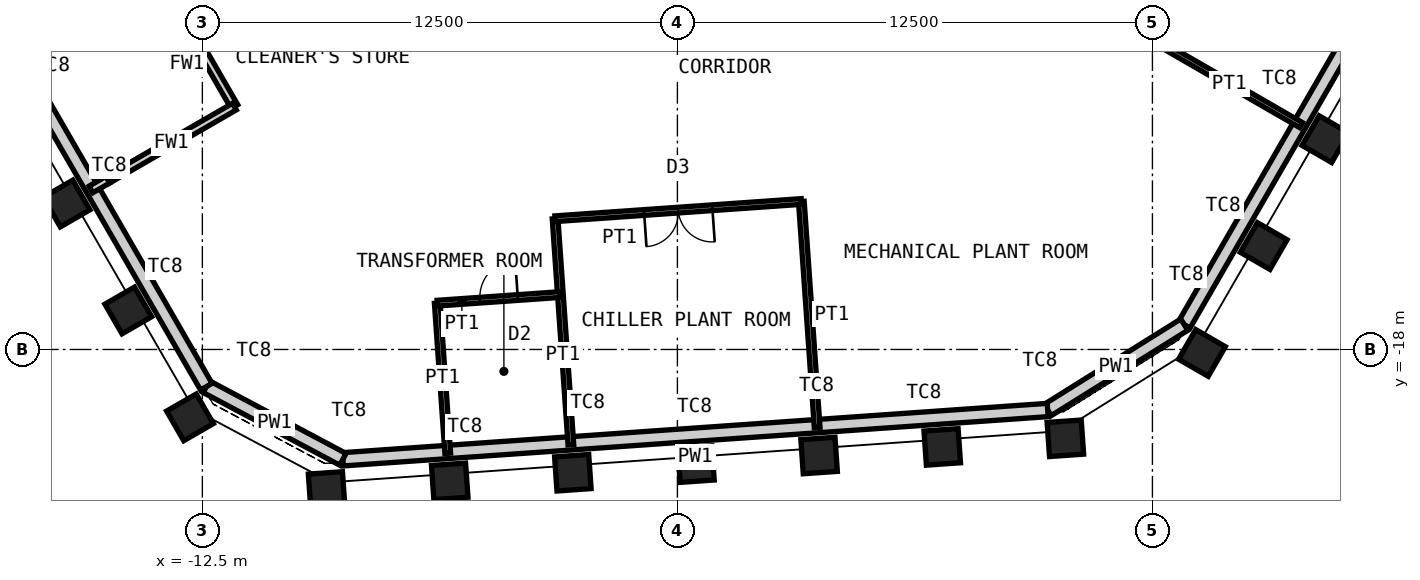
"""IFC4 building model, lengths in metres.
Left out: names, types, materials, properties, quantities, classifications, styles, units other than length and angle.
Written with IfcOpenShell. Run it as: python <this file> out.ifc"""

import sys

from ifc_helpers import new_model, si_unit, direction, frame, frame_2d, origin, origin_2d, place, context, subcontext, project, spatial, rectangle, hollow_rectangle, extrude, element, fill, save


model = new_model("IFC4")
c1 = context("Model", 3, precision=1e-05, world=origin(), true_north=direction((0.0, 1.0)))
c2 = subcontext(c1, "Body", "Model", "MODEL_VIEW")
j1 = project(units=[si_unit("LENGTHUNIT", "METRE"), si_unit("PLANEANGLEUNIT", "RADIAN")], contexts=[c1])
p1 = place(None, origin())
s1 = spatial("IfcSite", under=j1, at=p1, CompositionType="ELEMENT")
p2 = place(p1, origin())
s2 = spatial("IfcBuilding", under=s1, at=p2, CompositionType="ELEMENT")
p3 = place(p2, frame((0.0, 0.0, 343.6)))
s3 = spatial("IfcBuildingStorey", under=s2, at=p3, CompositionType="ELEMENT", Elevation=343.6)
for number, where, z_axis, x_axis in (
    (1, (17.052, -12.466, 0.0), (0.0, 0.0, 1.0), (0.5, 0.866, 0.0)),
    (2, (15.427, -15.279, 0.0), (0.0, 0.0, 1.0), (0.5, 0.866, 0.0)),
    (3, (13.803, -18.092, 0.0), (0.0, 0.0, 1.0), (0.5, 0.866, 0.0)),
    (4, (10.209, -20.337, 0.0), (0.0, 0.0, 1.0), (0.998, 0.07, 0.0)),
    (5, (6.969, -20.564, 0.0), (0.0, 0.0, 1.0), (0.998, 0.07, 0.0)),
    (6, (3.729, -20.791, 0.0), (0.0, 0.0, 1.0), (0.998, 0.07, 0.0)),
    (7, (0.489, -21.017, 0.0), (0.0, 0.0, 1.0), (0.998, 0.07, 0.0)),
    (8, (-2.751, -21.244, 0.0), (0.0, 0.0, 1.0), (0.998, 0.07, 0.0)),
    (9, (-5.991, -21.47, 0.0), (0.0, 0.0, 1.0), (0.998, 0.07, 0.0)),
    (10, (-9.231, -21.697, 0.0), (0.0, 0.0, 1.0), (0.998, 0.07, 0.0)),
    (11, (-12.825, -19.786, 0.0), (0.0, 0.0, 1.0), (0.5, -0.866, 0.0)),
    (12, (-14.449, -16.973, 0.0), (0.0, 0.0, 1.0), (0.5, -0.866, 0.0)),
    (13, (-16.073, -14.16, 0.0), (0.0, 0.0, 1.0), (0.5, -0.866, 0.0)),
):
    element("IfcColumn", number, at=place(p3, frame(where, z_axis=z_axis, x_axis=x_axis)), inside=s3, PredefinedType="COLUMN", context=c2, shape_type="SweptSolid", body=[
        extrude(hollow_rectangle(XDim=0.9, YDim=0.9, WallThickness=0.05, at=origin_2d()), origin(), (0.0, 0.0, 1.0), 4.65),
    ])
p4 = place(p3, frame((22.634, -1.246, 5.0), z_axis=(0.0, 0.0, 1.0), x_axis=(-0.499997535337, -0.866026826754, 0.0)))
e14 = element("IfcWall", 14, at=p4, inside=s3, PredefinedType="PARAPET", context=c2, shape_type="SweptSolid", body=[
    extrude(rectangle(XDim=18.592, YDim=0.35, at=frame_2d((9.296, 0.0))), origin(), (0.0, 0.0, 1.0), 1.2),
])
p5 = place(p3, frame((13.338, -17.347, 5.0), z_axis=(0.0, 0.0, 1.0), x_axis=(-0.848040374245, -0.529931621675, 0.0)))
e15 = element("IfcWall", 15, at=p5, inside=s3, PredefinedType="PARAPET", context=c2, shape_type="SweptSolid", body=[
    extrude(rectangle(XDim=4.238, YDim=0.35, at=frame_2d((2.119, 0.0))), origin(), (0.0, 0.0, 1.0), 1.2),
])
p6 = place(p3, frame((9.744, -19.593, 5.0), z_axis=(0.0, 0.0, 1.0), x_axis=(-0.997564169162, -0.069754773344, 0.0)))
e16 = element("IfcWall", 16, at=p6, inside=s3, PredefinedType="PARAPET", context=c2, shape_type="SweptSolid", body=[
    extrude(rectangle(XDim=18.592, YDim=0.35, at=frame_2d((9.296, 0.0))), origin(), (0.0, 0.0, 1.0), 1.2),
])
p7 = place(p3, frame((-8.802, -20.89, 5.0), z_axis=(0.0, 0.0, 1.0), x_axis=(-0.882943273379, 0.469479686456, 0.0)))
e17 = element("IfcWall", 17, at=p7, inside=s3, PredefinedType="PARAPET", context=c2, shape_type="SweptSolid", body=[
    extrude(rectangle(XDim=4.071, YDim=0.35, at=frame_2d((2.035, 0.0))), origin(), (0.0, 0.0, 1.0), 1.2),
])
p8 = place(p3, frame((-12.396, -18.979, 5.0), z_axis=(0.0, 0.0, 1.0), x_axis=(-0.500003221507, 0.866023543838, 0.0)))
e18 = element("IfcWall", 18, at=p8, inside=s3, PredefinedType="PARAPET", context=c2, shape_type="SweptSolid", body=[
    extrude(rectangle(XDim=18.592, YDim=0.35, at=frame_2d((9.296, 0.0))), origin(), (0.0, 0.0, 1.0), 1.2),
])
p9 = place(p3, frame((3.677, -20.052, 0.0), z_axis=(0.0, 0.0, 1.0), x_axis=(-0.069762273607, 0.997563644677, 0.0)))
e19 = element("IfcWall", 19, at=p9, inside=s3, PredefinedType="PARTITIONING", context=c2, shape_type="SweptSolid", body=[
    extrude(rectangle(XDim=5.96, YDim=0.15, at=frame_2d((2.98, 0.0))), origin(), (0.0, 0.0, 1.0), 3.75),
])
p10 = place(p3, frame((-2.803, -20.505, 0.0), z_axis=(0.0, 0.0, 1.0), x_axis=(-0.069762273607, 0.997563644677, 0.0)))
e20 = element("IfcWall", 20, at=p10, inside=s3, PredefinedType="PARTITIONING", context=c2, shape_type="SweptSolid", body=[
    extrude(rectangle(XDim=5.96, YDim=0.15, at=frame_2d((2.98, 0.0))), origin(), (0.0, 0.0, 1.0), 4.65),
])
p11 = place(p3, frame((3.262, -14.107, 0.0), z_axis=(0.0, 0.0, 1.0), x_axis=(-0.997564226446, -0.069753954123, 0.0)))
e21 = element("IfcWall", 21, at=p11, inside=s3, PredefinedType="PARTITIONING", context=c2, shape_type="SweptSolid", body=[
    extrude(rectangle(XDim=6.496, YDim=0.15, at=frame_2d((3.248, 0.0))), origin(), (0.0, 0.0, 1.0), 4.65),
])
p12 = place(p11, frame((2.348, 0.0, 0.0)))
e22 = element("IfcOpeningElement", 22, at=p12, cuts=e21, PredefinedType="OPENING", context=c2, shape_type="SweptSolid", body=[
    extrude(rectangle(XDim=1.8, YDim=2.4, at=frame_2d((0.9, 1.2))), frame((0.0, 0.085, 0.0), z_axis=(0.0, -1.0, 0.0), x_axis=(1.0, 0.0, 0.0)), (0.0, 0.0, 1.0), 0.17),
])
p13 = place(p3, frame((16.411, -12.096, 0.0), z_axis=(0.0, 0.0, 1.0), x_axis=(-0.866032659912, 0.499987431809, 0.0)))
e23 = element("IfcWall", 23, at=p13, inside=s3, PredefinedType="PARTITIONING", context=c2, shape_type="SweptSolid", body=[
    extrude(rectangle(XDim=4.36, YDim=0.15, at=frame_2d((2.18, 0.0))), origin(), (0.0, 0.0, 1.0), 3.75),
])
p14 = place(p3, frame((-15.433, -13.79, 0.0), z_axis=(0.0, 0.0, 1.0), x_axis=(0.866114856374, 0.499845031553, 0.0)))
e24 = element("IfcWall", 24, at=p14, inside=s3, PredefinedType="PARTITIONING", context=c2, shape_type="SweptSolid", body=[
    extrude(rectangle(XDim=0.517, YDim=0.2, at=frame_2d((0.259, 0.0))), origin(), (0.0, 0.0, 1.0), 3.75),
])
p15 = place(p3, frame((-11.657, -11.61, 0.0), z_axis=(0.0, 0.0, 1.0), x_axis=(-0.500003318956, 0.866023487576, 0.0)))
e25 = element("IfcWall", 25, at=p15, inside=s3, PredefinedType="PARTITIONING", context=c2, shape_type="SweptSolid", body=[
    extrude(rectangle(XDim=6.496, YDim=0.2, at=frame_2d((3.248, 0.0))), origin(), (0.0, 0.0, 1.0), 4.65),
])
p16 = place(p15, frame((4.197, 0.0, 0.0)))
e26 = element("IfcOpeningElement", 26, at=p16, cuts=e25, PredefinedType="OPENING", context=c2, shape_type="SweptSolid", body=[
    extrude(rectangle(XDim=2.0, YDim=2.4, at=frame_2d((1.0, 1.2))), frame((0.0, 0.11, 0.0), z_axis=(0.0, -1.0, 0.0), x_axis=(1.0, 0.0, 0.0)), (0.0, 0.0, 1.0), 0.22),
])
p17 = place(p3, frame((-6.043, -20.732, 0.0), z_axis=(0.0, 0.0, 1.0), x_axis=(-0.069792315638, 0.997561543303, 0.0)))
e27 = element("IfcWall", 27, at=p17, inside=s3, PredefinedType="PARTITIONING", context=c2, shape_type="SweptSolid", body=[
    extrude(rectangle(XDim=3.96, YDim=0.15, at=frame_2d((1.98, 0.0))), origin(), (0.0, 0.0, 1.0), 4.65),
])
p18 = place(p3, frame((-3.079, -16.555, 0.0), z_axis=(0.0, 0.0, 1.0), x_axis=(-0.9975644093, -0.069751339047, 0.0)))
e28 = element("IfcWall", 28, at=p18, inside=s3, PredefinedType="PARTITIONING", context=c2, shape_type="SweptSolid", body=[
    extrude(rectangle(XDim=3.248, YDim=0.15, at=frame_2d((1.624, 0.0))), origin(), (0.0, 0.0, 1.0), 4.65),
])
p19 = place(p18, frame((1.124, 0.0, 0.0)))
e29 = element("IfcOpeningElement", 29, at=p19, cuts=e28, PredefinedType="OPENING", context=c2, shape_type="SweptSolid", body=[
    extrude(rectangle(XDim=1.0, YDim=2.4, at=frame_2d((0.5, 1.2))), frame((0.0, 0.085, 0.0), z_axis=(0.0, -1.0, 0.0), x_axis=(1.0, 0.0, 0.0)), (0.0, 0.0, 1.0), 0.17),
])
p20 = place(p3, frame((-14.985, -13.531, 0.0), z_axis=(0.0, 0.0, 1.0), x_axis=(0.866021594059, 0.50000659858, 0.0)))
e30 = element("IfcWall", 30, at=p20, inside=s3, PredefinedType="PARTITIONING", context=c2, shape_type="SweptSolid", body=[
    extrude(rectangle(XDim=3.843, YDim=0.2, at=frame_2d((1.921, 0.0))), origin(), (0.0, 0.0, 1.0), 4.65),
])
p21 = place(p12, origin())
e31 = element("IfcDoor", 31, at=p21, inside=s3, OperationType="DOUBLE_DOOR_DOUBLE_SWING", PredefinedType="DOOR", context=c2, shape_type="SweptSolid", body=[
    extrude(rectangle(XDim=1.8, YDim=2.4, at=frame_2d((0.9, 1.2))), frame((0.0, 0.025, 0.0), z_axis=(0.0, -1.0, 0.0), x_axis=(1.0, 0.0, 0.0)), (0.0, 0.0, 1.0), 0.05),
])
fill(e22, e31)
p22 = place(p19, origin())
e32 = element("IfcDoor", 32, at=p22, inside=s3, OperationType="SINGLE_SWING_LEFT", PredefinedType="DOOR", context=c2, shape_type="SweptSolid", body=[
    extrude(rectangle(XDim=1.0, YDim=2.4, at=frame_2d((0.5, 1.2))), frame((0.0, 0.025, 0.0), z_axis=(0.0, -1.0, 0.0), x_axis=(1.0, 0.0, 0.0)), (0.0, 0.0, 1.0), 0.05),
])
fill(e29, e32)
save(model, sys.argv[1])
